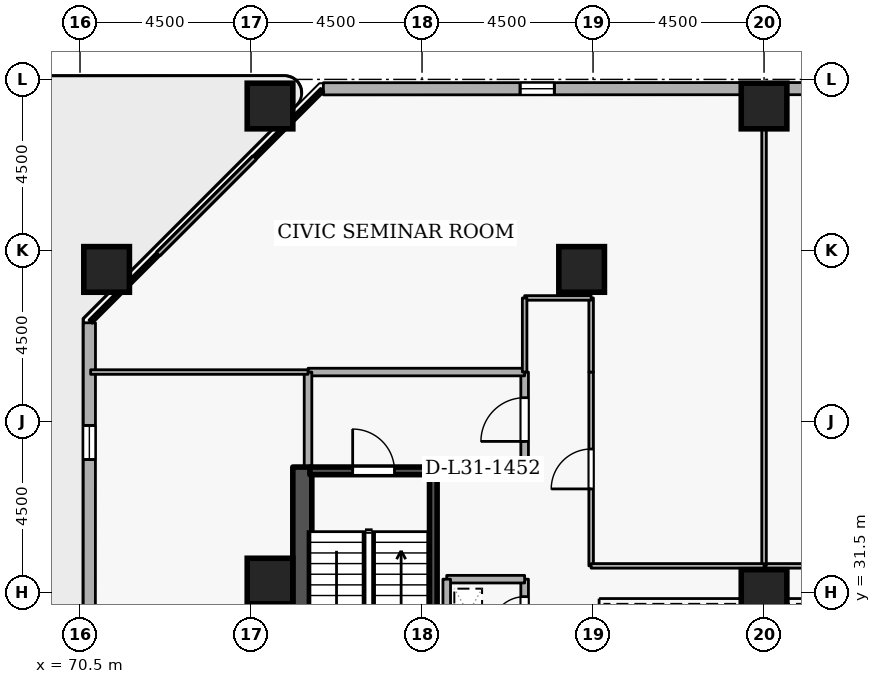
"""IFC4 building model, lengths in metres.
Left out: names, types, materials, properties, quantities, classifications, styles, units other than length and angle.
Written with IfcOpenShell. Run it as: python <this file> out.ifc"""

import sys

from ifc_helpers import new_model, si_unit, direction, frame, frame_2d, origin, origin_2d, place, context, subcontext, project, spatial, rectangle, extrude, element, fill, save


model = new_model("IFC4")
c1 = context("Model", 3, precision=1e-05, world=origin(), true_north=direction((0.0, 1.0)))
c2 = subcontext(c1, "Body", "Model", "MODEL_VIEW")
j1 = project(units=[si_unit("LENGTHUNIT", "METRE"), si_unit("PLANEANGLEUNIT", "RADIAN")], contexts=[c1])
p1 = place(None, origin())
s1 = spatial("IfcSite", under=j1, at=p1, CompositionType="ELEMENT")
p2 = place(p1, origin())
s2 = spatial("IfcBuilding", under=s1, at=p2, CompositionType="ELEMENT")
p3 = place(p2, frame((0.0, 0.0, 119.7)))
s3 = spatial("IfcBuildingStorey", under=s2, at=p3, CompositionType="ELEMENT", Elevation=119.7)
p4 = place(p3, frame((76.35, 19.2, 0.0), z_axis=(0.0, 0.0, 1.0), x_axis=(0.0, 1.0, 0.0)))
e1 = element("IfcWall", 1, at=p4, inside=s3, PredefinedType="SHEAR", context=c2, shape_type="SweptSolid", body=[
    extrude(rectangle(XDim=15.6, YDim=0.5, at=frame_2d((7.8, 0.0))), origin(), (0.0, 0.0, 1.0), 3.6),
])
for number, where, z_axis, x_axis in (
    (2, (88.5, 44.3, 0.0), (0.0, 0.0, 1.0), (1.0, 0.0, 0.0)),
    (3, (75.5, 44.3, 0.0), (0.0, 0.0, 1.0), (1.0, 0.0, 0.0)),
    (4, (71.2, 40.0, 0.0), (0.0, 0.0, 1.0), (1.0, 0.0, 0.0)),
    (5, (83.7, 40.0, 0.0), (0.0, 0.0, 1.0), (1.0, 0.0, 0.0)),
    (6, (75.5, 31.8, 0.0), (0.0, 0.0, 1.0), (1.0, 0.0, 0.0)),
    (7, (88.5, 31.5, 0.0), (0.0, 0.0, 1.0), (1.0, 0.0, 0.0)),
):
    element("IfcColumn", number, at=place(p3, frame(where, z_axis=z_axis, x_axis=x_axis)), inside=s3, PredefinedType="COLUMN", context=c2, shape_type="SweptSolid", body=[
        extrude(rectangle(XDim=1.2, YDim=1.2, at=origin_2d()), origin(), (0.0, 0.0, 1.0), 3.6),
    ])
p5 = place(p3, frame((109.681, 44.765, 0.0), z_axis=(0.0, 0.0, 1.0), x_axis=(-0.999999933399, -0.000364968916, 0.0)))
e8 = element("IfcWall", 8, at=p5, inside=s3, PredefinedType="STANDARD", context=c2, shape_type="SweptSolid", body=[
    extrude(rectangle(XDim=32.778, YDim=0.32, at=frame_2d((16.389, 0.0))), origin(), (0.0, 0.0, 1.0), 2.7),
])
p6 = place(p5, frame((2.7, 0.0, 0.72)))
e9 = element("IfcOpeningElement", 9, at=p6, cuts=e8, PredefinedType="OPENING", context=c2, shape_type="SweptSolid", body=[
    extrude(rectangle(XDim=0.9, YDim=1.75, at=frame_2d((0.45, 0.875))), frame((0.0, 0.17, 0.0), z_axis=(0.0, -1.0, 0.0), x_axis=(1.0, 0.0, 0.0)), (0.0, 0.0, 1.0), 0.34),
])
p7 = place(p5, frame((12.3, 0.0, 0.72)))
e10 = element("IfcOpeningElement", 10, at=p7, cuts=e8, PredefinedType="OPENING", context=c2, shape_type="SweptSolid", body=[
    extrude(rectangle(XDim=0.9, YDim=1.75, at=frame_2d((0.45, 0.875))), frame((0.0, 0.17, 0.0), z_axis=(0.0, -1.0, 0.0), x_axis=(1.0, 0.0, 0.0)), (0.0, 0.0, 1.0), 0.34),
])
p8 = place(p5, frame((17.1, 0.0, 0.72)))
e11 = element("IfcOpeningElement", 11, at=p8, cuts=e8, PredefinedType="OPENING", context=c2, shape_type="SweptSolid", body=[
    extrude(rectangle(XDim=0.9, YDim=1.75, at=frame_2d((0.45, 0.875))), frame((0.0, 0.17, 0.0), z_axis=(0.0, -1.0, 0.0), x_axis=(1.0, 0.0, 0.0)), (0.0, 0.0, 1.0), 0.34),
])
p9 = place(p5, frame((26.7, 0.0, 0.72)))
e12 = element("IfcOpeningElement", 12, at=p9, cuts=e8, PredefinedType="OPENING", context=c2, shape_type="SweptSolid", body=[
    extrude(rectangle(XDim=0.9, YDim=1.75, at=frame_2d((0.45, 0.875))), frame((0.0, 0.17, 0.0), z_axis=(0.0, -1.0, 0.0), x_axis=(1.0, 0.0, 0.0)), (0.0, 0.0, 1.0), 0.34),
])
p10 = place(p3, frame((70.747, 38.596, 0.0), z_axis=(0.0, 0.0, 1.0), x_axis=(-0.000364968916, -0.999999933399, 0.0)))
e13 = element("IfcWall", 13, at=p10, inside=s3, PredefinedType="STANDARD", context=c2, shape_type="SweptSolid", body=[
    extrude(rectangle(XDim=32.778, YDim=0.32, at=frame_2d((16.389, 0.0))), origin(), (0.0, 0.0, 1.0), 2.7),
])
p11 = place(p10, frame((26.664, 0.0, 0.0)))
e14 = element("IfcOpeningElement", 14, at=p11, cuts=e13, PredefinedType="OPENING", context=c2, shape_type="SweptSolid", body=[
    extrude(rectangle(XDim=1.15, YDim=2.1, at=frame_2d((0.575, 1.05))), frame((0.0, 0.17, 0.0), z_axis=(0.0, -1.0, 0.0), x_axis=(1.0, 0.0, 0.0)), (0.0, 0.0, 1.0), 0.34),
])
p12 = place(p10, frame((2.7, 0.0, 0.72)))
e15 = element("IfcOpeningElement", 15, at=p12, cuts=e13, PredefinedType="OPENING", context=c2, shape_type="SweptSolid", body=[
    extrude(rectangle(XDim=0.9, YDim=1.75, at=frame_2d((0.45, 0.875))), frame((0.0, 0.17, 0.0), z_axis=(0.0, -1.0, 0.0), x_axis=(1.0, 0.0, 0.0)), (0.0, 0.0, 1.0), 0.34),
])
p13 = place(p10, frame((7.5, 0.0, 0.72)))
e16 = element("IfcOpeningElement", 16, at=p13, cuts=e13, PredefinedType="OPENING", context=c2, shape_type="SweptSolid", body=[
    extrude(rectangle(XDim=0.9, YDim=1.75, at=frame_2d((0.45, 0.875))), frame((0.0, 0.17, 0.0), z_axis=(0.0, -1.0, 0.0), x_axis=(1.0, 0.0, 0.0)), (0.0, 0.0, 1.0), 0.34),
])
p14 = place(p10, frame((17.1, 0.0, 0.72)))
e17 = element("IfcOpeningElement", 17, at=p14, cuts=e13, PredefinedType="OPENING", context=c2, shape_type="SweptSolid", body=[
    extrude(rectangle(XDim=0.9, YDim=1.75, at=frame_2d((0.45, 0.875))), frame((0.0, 0.17, 0.0), z_axis=(0.0, -1.0, 0.0), x_axis=(1.0, 0.0, 0.0)), (0.0, 0.0, 1.0), 0.34),
])
p15 = place(p10, frame((21.9, 0.0, 0.72)))
e18 = element("IfcOpeningElement", 18, at=p15, cuts=e13, PredefinedType="OPENING", context=c2, shape_type="SweptSolid", body=[
    extrude(rectangle(XDim=0.9, YDim=1.75, at=frame_2d((0.45, 0.875))), frame((0.0, 0.17, 0.0), z_axis=(0.0, -1.0, 0.0), x_axis=(1.0, 0.0, 0.0)), (0.0, 0.0, 1.0), 0.34),
])
p16 = place(p3, frame((76.55, 34.7, 0.0), z_axis=(0.0, 0.0, 1.0), x_axis=(1.0, 0.0, 0.0)))
e19 = element("IfcWall", 19, at=p16, inside=s3, PredefinedType="SHEAR", context=c2, shape_type="SweptSolid", body=[
    extrude(rectangle(XDim=3.35, YDim=0.2, at=frame_2d((1.675, 0.0))), origin(), (0.0, 0.0, 1.0), 3.6),
])
p17 = place(p16, frame((1.125, 0.0, 0.0)))
e20 = element("IfcOpeningElement", 20, at=p17, cuts=e19, PredefinedType="OPENING", context=c2, shape_type="SweptSolid", body=[
    extrude(rectangle(XDim=1.1, YDim=2.1, at=frame_2d((0.55, 1.05))), frame((0.0, 0.11, 0.0), z_axis=(0.0, -1.0, 0.0), x_axis=(1.0, 0.0, 0.0)), (0.0, 0.0, 1.0), 0.22),
])
p18 = place(p3, frame((79.797, 27.45, 0.0), z_axis=(0.0, 0.0, 1.0), x_axis=(0.0, 1.0, 0.0)))
e21 = element("IfcWall", 21, at=p18, inside=s3, PredefinedType="SHEAR", context=c2, shape_type="SweptSolid", body=[
    extrude(rectangle(XDim=7.1, YDim=0.2, at=frame_2d((3.55, 0.0))), origin(), (0.0, 0.0, 1.0), 3.6),
])
p19 = place(p3, frame((79.9, 34.8, 0.0), z_axis=(0.0, 0.0, 1.0), x_axis=(1.0, 0.0, 0.0)))
e22 = element("IfcWall", 22, at=p19, inside=s3, PredefinedType="STANDARD", context=c2, shape_type="SweptSolid", body=[
    extrude(rectangle(XDim=2.3, YDim=0.2, at=frame_2d((1.15, 0.0))), origin(), (0.0, 0.0, 1.0), 2.525),
])
p20 = place(p3, frame((82.2, 34.8, 0.0), z_axis=(0.0, 0.0, 1.0), x_axis=(0.0, 1.0, 0.0)))
e23 = element("IfcWall", 23, at=p20, inside=s3, PredefinedType="STANDARD", context=c2, shape_type="SweptSolid", body=[
    extrude(rectangle(XDim=2.5, YDim=0.2, at=frame_2d((1.25, 0.0))), origin(), (0.0, 0.0, 1.0), 3.32),
])
p21 = place(p20, frame((0.675, 0.0, 0.0)))
e24 = element("IfcOpeningElement", 24, at=p21, cuts=e23, PredefinedType="OPENING", context=c2, shape_type="SweptSolid", body=[
    extrude(rectangle(XDim=1.15, YDim=2.1, at=frame_2d((0.575, 1.05))), frame((0.0, 0.11, 0.0), z_axis=(0.0, -1.0, 0.0), x_axis=(1.0, 0.0, 0.0)), (0.0, 0.0, 1.0), 0.22),
])
p22 = place(p3, frame((82.2, 37.3, 0.0), z_axis=(0.0, 0.0, 1.0), x_axis=(-1.0, 0.0, 0.0)))
e25 = element("IfcWall", 25, at=p22, inside=s3, PredefinedType="STANDARD", context=c2, shape_type="SweptSolid", body=[
    extrude(rectangle(XDim=5.7, YDim=0.2, at=frame_2d((2.85, 0.0))), origin(), (0.0, 0.0, 1.0), 3.32),
])
p23 = place(p3, frame((76.5, 37.3, 0.0), z_axis=(0.0, 0.0, 1.0), x_axis=(0.0, -1.0, 0.0)))
e26 = element("IfcWall", 26, at=p23, inside=s3, PredefinedType="STANDARD", context=c2, shape_type="SweptSolid", body=[
    extrude(rectangle(XDim=2.5, YDim=0.2, at=frame_2d((1.25, 0.0))), origin(), (0.0, 0.0, 1.0), 3.32),
])
p24 = place(p3, frame((82.2, 30.05, 0.0), z_axis=(0.0, 0.0, 1.0), x_axis=(0.0, 1.0, 0.0)))
e27 = element("IfcWall", 27, at=p24, inside=s3, PredefinedType="STANDARD", context=c2, shape_type="SweptSolid", body=[
    extrude(rectangle(XDim=1.8, YDim=0.2, at=frame_2d((0.9, 0.0))), origin(), (0.0, 0.0, 1.0), 3.32),
])
p25 = place(p24, frame((0.46, 0.0, 0.0)))
e28 = element("IfcOpeningElement", 28, at=p25, cuts=e27, PredefinedType="OPENING", context=c2, shape_type="SweptSolid", body=[
    extrude(rectangle(XDim=0.88, YDim=2.04, at=frame_2d((0.44, 1.02))), frame((0.0, 0.11, 0.0), z_axis=(0.0, -1.0, 0.0), x_axis=(1.0, 0.0, 0.0)), (0.0, 0.0, 1.0), 0.22),
])
p26 = place(p3, frame((82.2, 31.85, 0.0), z_axis=(0.0, 0.0, 1.0), x_axis=(-1.0, 0.0, 0.0)))
e29 = element("IfcWall", 29, at=p26, inside=s3, PredefinedType="STANDARD", context=c2, shape_type="SweptSolid", body=[
    extrude(rectangle(XDim=2.05, YDim=0.2, at=frame_2d((1.025, 0.0))), origin(), (0.0, 0.0, 1.0), 3.32),
])
p27 = place(p3, frame((80.15, 31.85, 0.0), z_axis=(0.0, 0.0, 1.0), x_axis=(0.0, -1.0, 0.0)))
e30 = element("IfcWall", 30, at=p27, inside=s3, PredefinedType="STANDARD", context=c2, shape_type="SweptSolid", body=[
    extrude(rectangle(XDim=1.8, YDim=0.2, at=frame_2d((0.9, 0.0))), origin(), (0.0, 0.0, 1.0), 3.32),
])
p28 = place(p3, frame((93.05, 32.2, 0.0), z_axis=(0.0, 0.0, 1.0), x_axis=(-1.0, 0.0, 0.0)))
e31 = element("IfcWall", 31, at=p28, inside=s3, PredefinedType="PARTITIONING", context=c2, shape_type="SweptSolid", body=[
    extrude(rectangle(XDim=4.55, YDim=0.12, at=frame_2d((2.275, 0.0))), origin(), (0.0, 0.0, 1.0), 3.32),
])
p29 = place(p3, frame((88.5, 32.2, 0.0), z_axis=(0.0, 0.0, 1.0), x_axis=(0.0, 1.0, 0.0)))
e32 = element("IfcWall", 32, at=p29, inside=s3, PredefinedType="PARTITIONING", context=c2, shape_type="SweptSolid", body=[
    extrude(rectangle(XDim=12.52, YDim=0.12, at=frame_2d((6.26, 0.0))), origin(), (0.0, 0.0, 1.0), 2.912),
])
p30 = place(p3, frame((83.95, 32.2, 0.0), z_axis=(0.0, 0.0, 1.0), x_axis=(0.0, 1.0, 0.0)))
e33 = element("IfcWall", 33, at=p30, inside=s3, PredefinedType="PARTITIONING", context=c2, shape_type="SweptSolid", body=[
    extrude(rectangle(XDim=5.1, YDim=0.12, at=frame_2d((2.55, 0.0))), origin(), (0.0, 0.0, 1.0), 3.32),
])
p31 = place(p30, frame((2.025, 0.0, 0.0)))
e34 = element("IfcOpeningElement", 34, at=p31, cuts=e33, PredefinedType="OPENING", context=c2, shape_type="SweptSolid", body=[
    extrude(rectangle(XDim=1.05, YDim=2.1, at=frame_2d((0.525, 1.05))), frame((0.0, 0.07, 0.0), z_axis=(0.0, -1.0, 0.0), x_axis=(1.0, 0.0, 0.0)), (0.0, 0.0, 1.0), 0.14),
])
p32 = place(p3, frame((83.95, 37.3, 0.0), z_axis=(0.0, 0.0, 1.0), x_axis=(0.0, 1.0, 0.0)))
e35 = element("IfcWall", 35, at=p32, inside=s3, PredefinedType="PARTITIONING", context=c2, shape_type="SweptSolid", body=[
    extrude(rectangle(XDim=1.95, YDim=0.12, at=frame_2d((0.975, 0.0))), origin(), (0.0, 0.0, 1.0), 3.32),
])
p33 = place(p3, frame((83.95, 39.25, 0.0), z_axis=(0.0, 0.0, 1.0), x_axis=(-1.0, 0.0, 0.0)))
e36 = element("IfcWall", 36, at=p33, inside=s3, PredefinedType="PARTITIONING", context=c2, shape_type="SweptSolid", body=[
    extrude(rectangle(XDim=1.75, YDim=0.12, at=frame_2d((0.875, 0.0))), origin(), (0.0, 0.0, 1.0), 3.32),
])
p34 = place(p3, frame((82.2, 39.25, 0.0), z_axis=(0.0, 0.0, 1.0), x_axis=(0.0, -1.0, 0.0)))
e37 = element("IfcWall", 37, at=p34, inside=s3, PredefinedType="PARTITIONING", context=c2, shape_type="SweptSolid", body=[
    extrude(rectangle(XDim=1.95, YDim=0.12, at=frame_2d((0.975, 0.0))), origin(), (0.0, 0.0, 1.0), 3.32),
])
p35 = place(p3, frame((76.5, 37.3, 0.0), z_axis=(0.0, 0.0, 1.0), x_axis=(-1.0, 0.0, 0.0)))
e38 = element("IfcWall", 38, at=p35, inside=s3, PredefinedType="PARTITIONING", context=c2, shape_type="SweptSolid", body=[
    extrude(rectangle(XDim=5.72, YDim=0.12, at=frame_2d((2.86, 0.0))), origin(), (0.0, 0.0, 1.0), 3.32),
])
p36 = place(p3, frame((70.78, 38.625, 0.0), z_axis=(0.0, 0.0, 1.0), x_axis=(0.707106781187, 0.707106781187, 0.0)))
e39 = element("IfcWall", 39, at=p36, inside=s3, PredefinedType="PARTITIONING", context=c2, shape_type="SweptSolid", body=[
    extrude(rectangle(XDim=8.619, YDim=0.12, at=frame_2d((4.31, 0.0))), origin(), (0.0, 0.0, 1.0), 3.32),
])
p37 = place(p3, frame((88.5, 32.2, 0.0), z_axis=(0.0, 0.0, 1.0), x_axis=(-1.0, 0.0, 0.0)))
e40 = element("IfcWall", 40, at=p37, inside=s3, PredefinedType="PARTITIONING", context=c2, shape_type="SweptSolid", body=[
    extrude(rectangle(XDim=4.55, YDim=0.12, at=frame_2d((2.275, 0.0))), origin(), (0.0, 0.0, 1.0), 3.32),
])
p38 = place(p9, origin())
e41 = element("IfcWindow", 41, at=p38, inside=s3, PartitioningType="SINGLE_PANEL", PredefinedType="WINDOW", context=c2, shape_type="SweptSolid", body=[
    extrude(rectangle(XDim=0.9, YDim=1.75, at=frame_2d((0.45, 0.875))), frame((0.0, 0.03, 0.0), z_axis=(0.0, -1.0, 0.0), x_axis=(1.0, 0.0, 0.0)), (0.0, 0.0, 1.0), 0.06),
])
fill(e12, e41)
p39 = place(p12, origin())
e42 = element("IfcWindow", 42, at=p39, inside=s3, PartitioningType="SINGLE_PANEL", PredefinedType="WINDOW", context=c2, shape_type="SweptSolid", body=[
    extrude(rectangle(XDim=0.9, YDim=1.75, at=frame_2d((0.45, 0.875))), frame((0.0, 0.03, 0.0), z_axis=(0.0, -1.0, 0.0), x_axis=(1.0, 0.0, 0.0)), (0.0, 0.0, 1.0), 0.06),
])
fill(e15, e42)
p40 = place(p17, origin())
e43 = element("IfcDoor", 43, at=p40, inside=s3, OperationType="SINGLE_SWING_LEFT", PredefinedType="DOOR", context=c2, shape_type="SweptSolid", body=[
    extrude(rectangle(XDim=1.1, YDim=2.1, at=frame_2d((0.55, 1.05))), frame((0.0, 0.025, 0.0), z_axis=(0.0, -1.0, 0.0), x_axis=(1.0, 0.0, 0.0)), (0.0, 0.0, 1.0), 0.05),
])
fill(e20, e43)
p41 = place(p21, origin())
e44 = element("IfcDoor", 44, at=p41, inside=s3, OperationType="SINGLE_SWING_LEFT", PredefinedType="DOOR", context=c2, shape_type="SweptSolid", body=[
    extrude(rectangle(XDim=1.15, YDim=2.1, at=frame_2d((0.575, 1.05))), frame((0.0, 0.025, 0.0), z_axis=(0.0, -1.0, 0.0), x_axis=(1.0, 0.0, 0.0)), (0.0, 0.0, 1.0), 0.05),
])
fill(e24, e44)
p42 = place(p25, origin())
e45 = element("IfcDoor", 45, at=p42, inside=s3, OperationType="SINGLE_SWING_LEFT", PredefinedType="DOOR", context=c2, shape_type="SweptSolid", body=[
    extrude(rectangle(XDim=0.88, YDim=2.04, at=frame_2d((0.44, 1.02))), frame((0.0, 0.025, 0.0), z_axis=(0.0, -1.0, 0.0), x_axis=(1.0, 0.0, 0.0)), (0.0, 0.0, 1.0), 0.05),
])
fill(e28, e45)
p43 = place(p31, origin())
e46 = element("IfcDoor", 46, at=p43, inside=s3, OperationType="SINGLE_SWING_LEFT", PredefinedType="DOOR", context=c2, shape_type="SweptSolid", body=[
    extrude(rectangle(XDim=1.05, YDim=2.1, at=frame_2d((0.525, 1.05))), frame((0.0, 0.025, 0.0), z_axis=(0.0, -1.0, 0.0), x_axis=(1.0, 0.0, 0.0)), (0.0, 0.0, 1.0), 0.05),
])
fill(e34, e46)
save(model, sys.argv[1])
